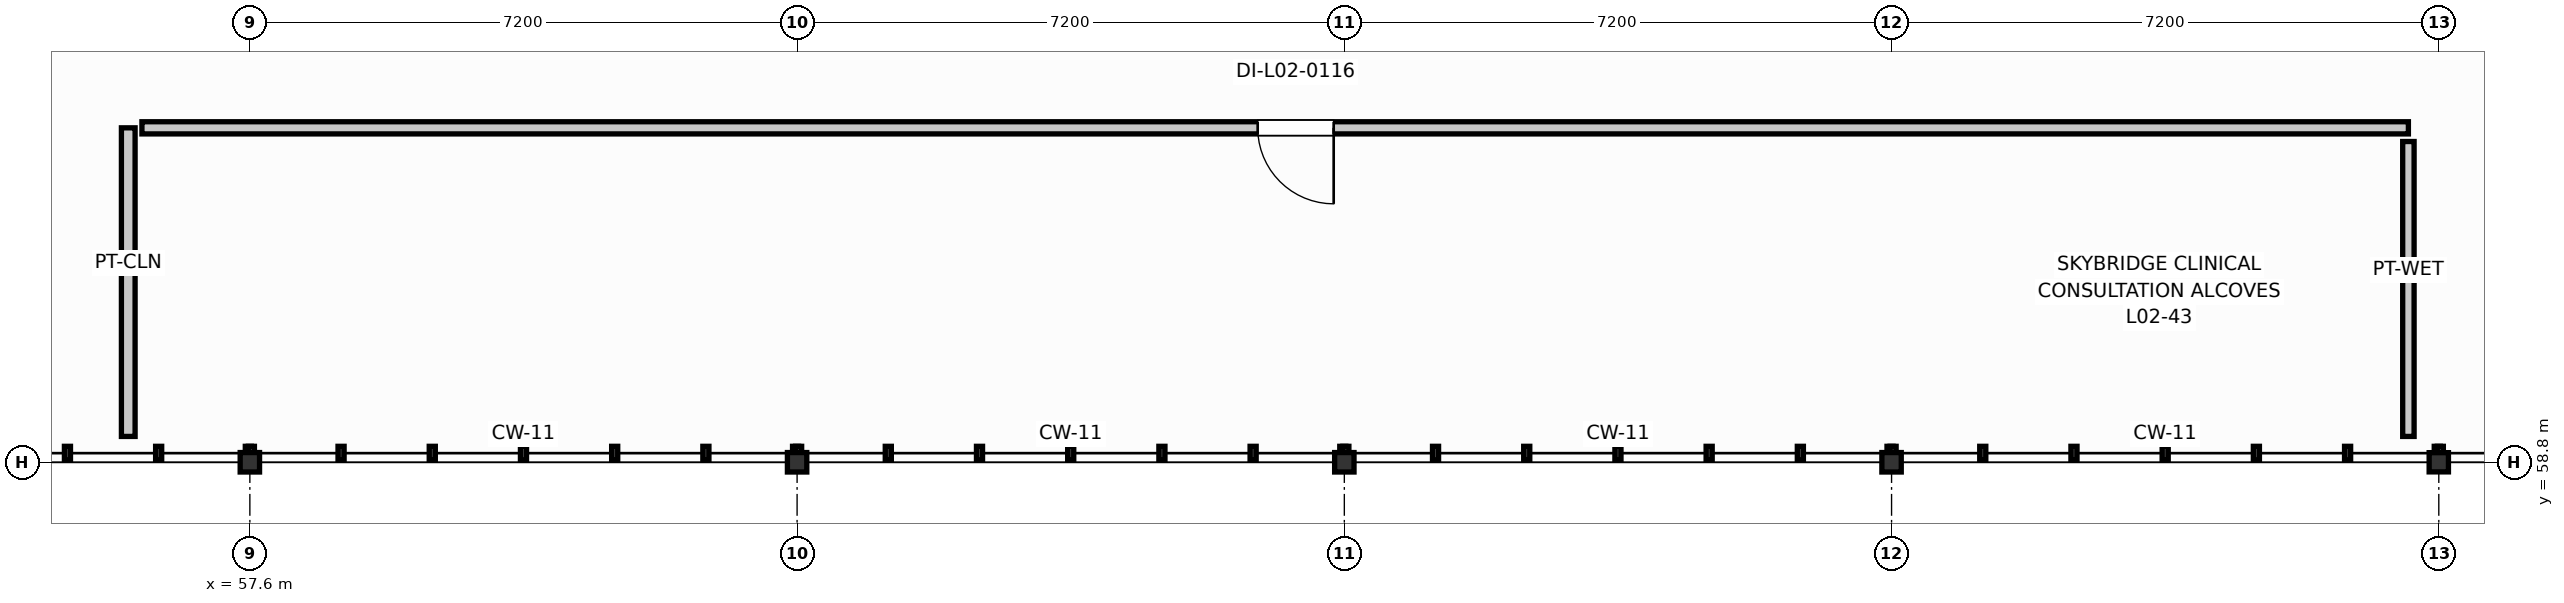
"""IFC4 building model, lengths in metres.
Left out: names, types, materials, properties, quantities, classifications, styles, units other than length and angle.
Written with IfcOpenShell. Run it as: python <this file> out.ifc"""

import sys

from ifc_helpers import new_model, si_unit, direction, frame, frame_2d, origin, origin_2d, place, context, subcontext, project, spatial, rectangle, i_section, extrude, element, fill, save


model = new_model("IFC4")
c1 = context("Model", 3, precision=1e-05, world=origin(), true_north=direction((0.0, 1.0)))
c2 = subcontext(c1, "Body", "Model", "MODEL_VIEW")
j1 = project(units=[si_unit("LENGTHUNIT", "METRE"), si_unit("PLANEANGLEUNIT", "RADIAN")], contexts=[c1])
p1 = place(None, origin())
s1 = spatial("IfcSite", under=j1, at=p1, CompositionType="ELEMENT")
p2 = place(p1, origin())
s2 = spatial("IfcBuilding", under=s1, at=p2, CompositionType="ELEMENT")
p3 = place(p2, frame((0.0, 0.0, 9.0)))
s3 = spatial("IfcBuildingStorey", under=s2, at=p3, CompositionType="ELEMENT", Elevation=9.0)
for number, where, z_axis, x_axis in (
    (1, (57.6, 58.8, 0.0), (0.0, 0.0, 1.0), (1.0, 0.0, 0.0)),
    (2, (64.8, 58.8, 0.0), (0.0, 0.0, 1.0), (1.0, 0.0, 0.0)),
    (3, (72.0, 58.8, 0.0), (0.0, 0.0, 1.0), (1.0, 0.0, 0.0)),
    (4, (79.2, 58.8, 0.0), (0.0, 0.0, 1.0), (1.0, 0.0, 0.0)),
):
    element("IfcColumn", number, at=place(p3, frame(where, z_axis=z_axis, x_axis=x_axis)), inside=s3, PredefinedType="COLUMN", context=c2, shape_type="SweptSolid", body=[
        extrude(i_section(OverallWidth=0.255, OverallDepth=0.256, WebThickness=0.01, FlangeThickness=0.016, FilletRadius=0.013, at=origin_2d()), origin(), (0.0, 0.0, 1.0), 4.2),
    ])
p4 = place(p3, frame((86.4, 58.8, 0.0), z_axis=(0.0, 0.0, 1.0), x_axis=(1.0, 0.0, 0.0)))
e5 = element("IfcColumn", 5, at=p4, inside=s3, PredefinedType="COLUMN", context=c2, shape_type="SweptSolid", body=[
    extrude(i_section(OverallWidth=0.254, OverallDepth=0.253, WebThickness=0.009, FlangeThickness=0.014, FilletRadius=0.013, at=origin_2d()), origin(), (0.0, 0.0, 1.0), 4.2),
])
p5 = place(p3, frame((56.0, 59.14, 0.0), z_axis=(0.0, 0.0, 1.0), x_axis=(0.0, 1.0, 0.0)))
e6 = element("IfcWall", 6, at=p5, inside=s3, PredefinedType="PARTITIONING", context=c2, shape_type="SweptSolid", body=[
    extrude(rectangle(XDim=4.06, YDim=0.18, at=frame_2d((2.03, 0.0))), origin(), (0.0, 0.0, 1.0), 3.945),
])
p6 = place(p3, frame((56.18, 63.2, 0.0), z_axis=(0.0, 0.0, 1.0), x_axis=(1.0, 0.0, 0.0)))
e7 = element("IfcWall", 7, at=p6, inside=s3, PredefinedType="PARTITIONING", context=c2, shape_type="SweptSolid", body=[
    extrude(rectangle(XDim=29.82, YDim=0.16, at=frame_2d((14.91, 0.0))), origin(), (0.0, 0.0, 1.0), 3.175),
])
p7 = place(p6, frame((14.68, 0.0, 0.0)))
e8 = element("IfcOpeningElement", 8, at=p7, cuts=e7, PredefinedType="OPENING", context=c2, shape_type="SweptSolid", body=[
    extrude(rectangle(XDim=1.0, YDim=2.15, at=frame_2d((0.5, 1.075))), frame((0.0, 0.09, 0.0), z_axis=(0.0, -1.0, 0.0), x_axis=(1.0, 0.0, 0.0)), (0.0, 0.0, 1.0), 0.18),
])
p8 = place(p3, frame((86.0, 63.02, 0.0), z_axis=(0.0, 0.0, 1.0), x_axis=(0.0, -1.0, 0.0)))
e9 = element("IfcWall", 9, at=p8, inside=s3, PredefinedType="PLUMBINGWALL", context=c2, shape_type="SweptSolid", body=[
    extrude(rectangle(XDim=3.88, YDim=0.15, at=frame_2d((1.94, 0.0))), origin(), (0.0, 0.0, 1.0), 3.945),
])
p9 = place(p7, frame((1.0, 0.0, 0.0), z_axis=(0.0, 0.0, 1.0), x_axis=(-1.0, 0.0, 0.0)))
e10 = element("IfcDoor", 10, at=p9, inside=s3, OperationType="SINGLE_SWING_LEFT", PredefinedType="DOOR", context=c2, shape_type="SweptSolid", body=[
    extrude(rectangle(XDim=1.0, YDim=2.15, at=frame_2d((0.5, 1.075))), frame((0.0, 0.025, 0.0), z_axis=(0.0, -1.0, 0.0), x_axis=(1.0, 0.0, 0.0)), (0.0, 0.0, 1.0), 0.05),
])
fill(e8, e10)
save(model, sys.argv[1])
